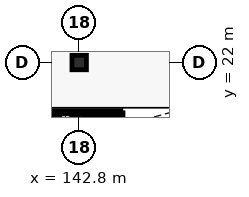
"""IFC4 building model, lengths in metres.
Left out: names, types, materials, properties, quantities, classifications, styles, units other than length and angle.
Written with IfcOpenShell. Run it as: python <this file> out.ifc"""

import sys

from ifc_helpers import new_model, si_unit, direction, frame, frame_2d, origin, origin_2d, place, context, subcontext, project, spatial, rectangle, extrude, element, save


model = new_model("IFC4")
c1 = context("Model", 3, precision=1e-05, world=origin(), true_north=direction((0.0, 1.0)))
c2 = subcontext(c1, "Body", "Model", "MODEL_VIEW")
j1 = project(units=[si_unit("LENGTHUNIT", "METRE"), si_unit("PLANEANGLEUNIT", "RADIAN")], contexts=[c1])
p1 = place(None, origin())
s1 = spatial("IfcSite", under=j1, at=p1, CompositionType="ELEMENT")
p2 = place(p1, origin())
s2 = spatial("IfcBuilding", under=s1, at=p2, CompositionType="ELEMENT")
p3 = place(p2, origin())
s3 = spatial("IfcBuildingStorey", under=s2, at=p3, CompositionType="ELEMENT", Elevation=0.0)
p4 = place(p3, frame((142.8, 22.0, -0.46), z_axis=(0.0, 0.0, 1.0), x_axis=(1.0, 0.0, 0.0)))
e1 = element("IfcColumn", 1, at=p4, inside=s3, PredefinedType="COLUMN", context=c2, shape_type="SweptSolid", body=[
    extrude(rectangle(XDim=0.95, YDim=0.95, at=origin_2d()), origin(), (0.0, 0.0, 1.0), 5.9),
])
p5 = place(p3, frame((136.66, 18.69, 0.0), z_axis=(0.0, 0.0, 1.0), x_axis=(1.0, 0.0, 0.0)))
e2 = element("IfcWall", 2, at=p5, inside=s3, PredefinedType="SHEAR", context=c2, shape_type="SweptSolid", body=[
    extrude(rectangle(XDim=8.88, YDim=0.28, at=frame_2d((4.44, 0.0))), origin(), (0.0, 0.0, 1.0), 5.44),
])
p6 = place(p3, frame((145.54, 15.26, 0.0), z_axis=(0.0, 0.0, 1.0), x_axis=(0.0, 1.0, 0.0)))
e3 = element("IfcWall", 3, at=p6, inside=s3, PredefinedType="SHEAR", context=c2, shape_type="SweptSolid", body=[
    extrude(rectangle(XDim=3.43, YDim=0.28, at=frame_2d((1.715, 0.0))), origin(), (0.0, 0.0, 1.0), 5.44),
])
save(model, sys.argv[1])
